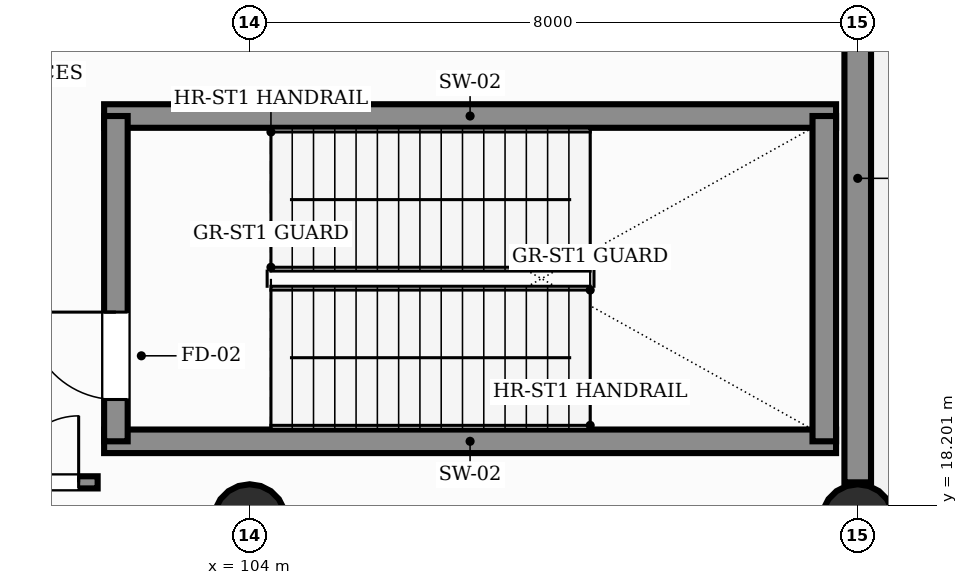
"""IFC4 building model, lengths in metres.
Left out: names, types, materials, properties, quantities, classifications, styles, units other than length and angle.
Written with IfcOpenShell. Run it as: python <this file> out.ifc"""

import sys

from ifc_helpers import new_model, si_unit, direction, frame, frame_2d, origin, origin_2d, place, context, subcontext, project, spatial, rectangle, circle, extrude, element, fill, save


model = new_model("IFC4")
c1 = context("Model", 3, precision=1e-05, world=origin(), true_north=direction((0.0, 1.0)))
c2 = subcontext(c1, "Body", "Model", "MODEL_VIEW")
j1 = project(units=[si_unit("LENGTHUNIT", "METRE"), si_unit("PLANEANGLEUNIT", "RADIAN")], contexts=[c1])
p1 = place(None, origin())
s1 = spatial("IfcSite", under=j1, at=p1, CompositionType="ELEMENT")
p2 = place(p1, origin())
s2 = spatial("IfcBuilding", under=s1, at=p2, CompositionType="ELEMENT")
p3 = place(p2, origin())
s3 = spatial("IfcBuildingStorey", under=s2, at=p3, CompositionType="ELEMENT", Elevation=0.0)
for number, where, z_axis, x_axis in (
    (1, (104.0, 18.0, 0.0), (0.0, 0.0, 1.0), (1.0, 0.0, 0.0)),
    (2, (112.0, 18.0, 0.0), (0.0, 0.0, 1.0), (1.0, 0.0, 0.0)),
):
    element("IfcColumn", number, at=place(p3, frame(where, z_axis=z_axis, x_axis=x_axis)), inside=s3, PredefinedType="COLUMN", context=c2, shape_type="SweptSolid", body=[
        extrude(circle(Radius=0.475, at=origin_2d()), origin(), (0.0, 0.0, 1.0), 6.0),
    ])
p4 = place(p3, frame((112.0, 18.5, 0.0), z_axis=(0.0, 0.0, 1.0), x_axis=(0.0, 1.0, 0.0)))
e3 = element("IfcWall", 3, at=p4, inside=s3, PredefinedType="SOLIDWALL", context=c2, shape_type="SweptSolid", body=[
    extrude(rectangle(XDim=8.0, YDim=0.35, at=frame_2d((4.0, 0.0))), origin(), (0.0, 0.0, 1.0), 4.7),
])
for number, where, z_axis, x_axis in (
    (4, (102.085, 19.04, 0.0), (0.0, 0.0, 1.0), (1.0, 0.0, 0.0)),
    (5, (102.085, 23.32, 0.0), (0.0, 0.0, 1.0), (1.0, 0.0, 0.0)),
):
    element("IfcWall", number, at=place(p3, frame(where, z_axis=z_axis, x_axis=x_axis)), inside=s3, PredefinedType="SHEAR", context=c2, shape_type="SweptSolid", body=[
        extrude(rectangle(XDim=9.63, YDim=0.31, at=frame_2d((4.815, 0.0))), origin(), (0.0, 0.0, 1.0), 6.0),
    ])
p5 = place(p3, frame((102.24, 19.04, 0.0), z_axis=(0.0, 0.0, 1.0), x_axis=(0.0, 1.0, 0.0)))
e6 = element("IfcWall", 6, at=p5, inside=s3, PredefinedType="SHEAR", context=c2, shape_type="SweptSolid", body=[
    extrude(rectangle(XDim=4.28, YDim=0.31, at=frame_2d((2.14, 0.0))), origin(), (0.0, 0.0, 1.0), 6.0),
])
p6 = place(p5, frame((0.55, 0.0, 0.0)))
e7 = element("IfcOpeningElement", 7, at=p6, cuts=e6, PredefinedType="OPENING", context=c2, shape_type="SweptSolid", body=[
    extrude(rectangle(XDim=1.15, YDim=2.2, at=frame_2d((0.575, 1.1))), frame((0.0, 0.165, 0.0), z_axis=(0.0, -1.0, 0.0), x_axis=(1.0, 0.0, 0.0)), (0.0, 0.0, 1.0), 0.33),
])
p7 = place(p3, frame((111.56, 19.04, 0.0), z_axis=(0.0, 0.0, 1.0), x_axis=(0.0, 1.0, 0.0)))
e8 = element("IfcWall", 8, at=p7, inside=s3, PredefinedType="SHEAR", context=c2, shape_type="SweptSolid", body=[
    extrude(rectangle(XDim=4.28, YDim=0.31, at=frame_2d((2.14, 0.0))), origin(), (0.0, 0.0, 1.0), 6.0),
])
p8 = place(p3, frame((96.8, 18.5, 0.0), z_axis=(0.0, 0.0, 1.0), x_axis=(1.0, 0.0, 0.0)))
e9 = element("IfcWall", 9, at=p8, inside=s3, PredefinedType="PARTITIONING", context=c2, shape_type="SweptSolid", body=[
    extrude(rectangle(XDim=5.2, YDim=0.16, at=frame_2d((2.6, 0.0))), origin(), (0.0, 0.0, 1.0), 4.65),
])
p9 = place(p8, frame((3.2, 0.0, 0.0)))
e10 = element("IfcOpeningElement", 10, at=p9, cuts=e9, PredefinedType="OPENING", context=c2, shape_type="SweptSolid", body=[
    extrude(rectangle(XDim=1.75, YDim=2.35, at=frame_2d((0.875, 1.175))), frame((0.0, 0.09, 0.0), z_axis=(0.0, -1.0, 0.0), x_axis=(1.0, 0.0, 0.0)), (0.0, 0.0, 1.0), 0.18),
])
p10 = place(p6, origin())
e11 = element("IfcDoor", 11, at=p10, inside=s3, OperationType="SINGLE_SWING_RIGHT", PredefinedType="DOOR", context=c2, shape_type="SweptSolid", body=[
    extrude(rectangle(XDim=1.15, YDim=2.2, at=frame_2d((0.575, 1.1))), frame((0.0, 0.025, 0.0), z_axis=(0.0, -1.0, 0.0), x_axis=(1.0, 0.0, 0.0)), (0.0, 0.0, 1.0), 0.05),
])
fill(e7, e11)
p11 = place(p9, origin())
e12 = element("IfcDoor", 12, at=p11, inside=s3, OperationType="DOUBLE_DOOR_SINGLE_SWING", PredefinedType="DOOR", context=c2, shape_type="SweptSolid", body=[
    extrude(rectangle(XDim=1.75, YDim=2.35, at=frame_2d((0.875, 1.175))), frame((0.0, 0.025, 0.0), z_axis=(0.0, -1.0, 0.0), x_axis=(1.0, 0.0, 0.0)), (0.0, 0.0, 1.0), 0.05),
])
fill(e10, e12)
save(model, sys.argv[1])
